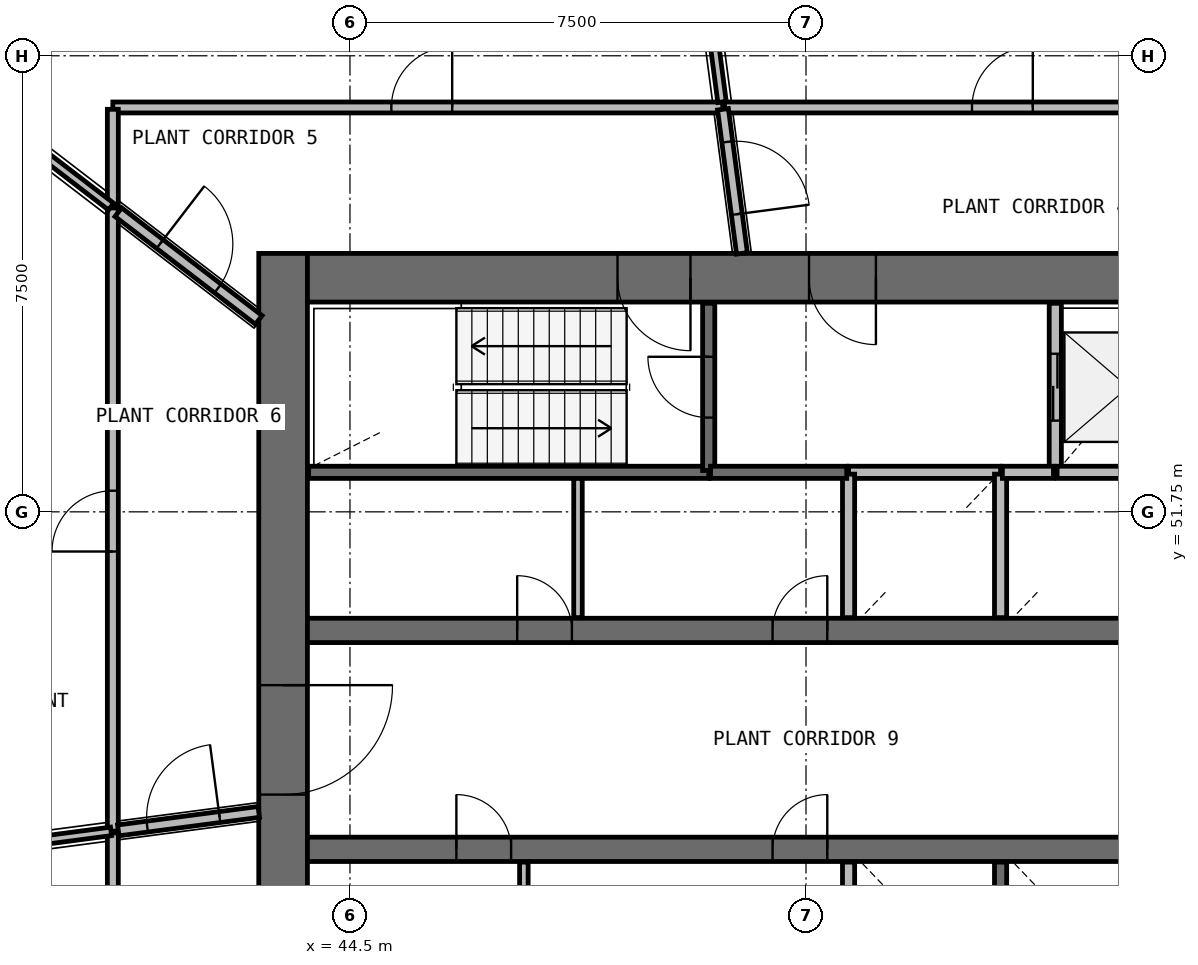
"""IFC4 building model, lengths in metres.
Left out: names, types, materials, properties, quantities, classifications, styles, units other than length and angle.
Written with IfcOpenShell. Run it as: python <this file> out.ifc"""

import sys

from ifc_helpers import new_model, si_unit, direction, frame, frame_2d, origin, place, context, subcontext, project, spatial, rectangle, extrude, source, transform, mapped, element, fill, save


model = new_model("IFC4")
c1 = context("Model", 3, precision=1e-05, world=origin(), true_north=direction((0.0, 1.0)))
c2 = subcontext(c1, "Body", "Model", "MODEL_VIEW")
j1 = project(units=[si_unit("LENGTHUNIT", "METRE"), si_unit("PLANEANGLEUNIT", "RADIAN")], contexts=[c1])
p1 = place(None, origin())
s1 = spatial("IfcSite", under=j1, at=p1, CompositionType="ELEMENT")
p2 = place(p1, origin())
s2 = spatial("IfcBuilding", under=s1, at=p2, CompositionType="ELEMENT")
p3 = place(p2, frame((0.0, 0.0, 179.9)))
s3 = spatial("IfcBuildingStorey", under=s2, at=p3, CompositionType="ELEMENT", Elevation=179.9)
p4 = place(p3, frame((43.4, 56.0, 0.0), z_axis=(0.0, 0.0, 1.0), x_axis=(0.0, -1.0, 0.0)))
e1 = element("IfcWall", 1, at=p4, inside=s3, PredefinedType="SHEAR", context=c2, shape_type="SweptSolid", body=[
    extrude(rectangle(XDim=16.0, YDim=0.8, at=frame_2d((8.0, 0.0))), origin(), (0.0, 0.0, 1.0), 3.9),
])
p5 = place(p4, frame((7.1, 0.0, 0.0)))
e2 = element("IfcOpeningElement", 2, at=p5, cuts=e1, PredefinedType="OPENING", context=c2, shape_type="SweptSolid", body=[
    extrude(rectangle(XDim=1.8, YDim=2.1, at=frame_2d((0.9, 1.05))), frame((0.0, 0.41, 0.0), z_axis=(0.0, -1.0, 0.0), x_axis=(1.0, 0.0, 0.0)), (0.0, 0.0, 1.0), 0.82),
])
p6 = place(p3, frame((60.2, 55.6, 0.0), z_axis=(0.0, 0.0, 1.0), x_axis=(-1.0, 0.0, 0.0)))
e3 = element("IfcWall", 3, at=p6, inside=s3, PredefinedType="SHEAR", context=c2, shape_type="SweptSolid", body=[
    extrude(rectangle(XDim=16.4, YDim=0.8, at=frame_2d((8.2, 0.0))), origin(), (0.0, 0.0, 1.0), 3.9),
])
p7 = place(p6, frame((0.2, 0.0, 0.0)))
e4 = element("IfcOpeningElement", 4, at=p7, cuts=e3, PredefinedType="OPENING", context=c2, shape_type="SweptSolid", body=[
    extrude(rectangle(XDim=1.1, YDim=2.1, at=frame_2d((0.55, 1.05))), frame((0.0, 0.41, 0.0), z_axis=(0.0, -1.0, 0.0), x_axis=(1.0, 0.0, 0.0)), (0.0, 0.0, 1.0), 0.82),
])
p8 = place(p6, frame((10.1, 0.0, 0.0)))
e5 = element("IfcOpeningElement", 5, at=p8, cuts=e3, PredefinedType="OPENING", context=c2, shape_type="SweptSolid", body=[
    extrude(rectangle(XDim=1.2, YDim=2.1, at=frame_2d((0.6, 1.05))), frame((0.0, 0.41, 0.0), z_axis=(0.0, -1.0, 0.0), x_axis=(1.0, 0.0, 0.0)), (0.0, 0.0, 1.0), 0.82),
])
p9 = place(p6, frame((7.05, 0.0, 0.0)))
e6 = element("IfcOpeningElement", 6, at=p9, cuts=e3, PredefinedType="OPENING", context=c2, shape_type="SweptSolid", body=[
    extrude(rectangle(XDim=1.1, YDim=2.1, at=frame_2d((0.55, 1.05))), frame((0.0, 0.41, 0.0), z_axis=(0.0, -1.0, 0.0), x_axis=(1.0, 0.0, 0.0)), (0.0, 0.0, 1.0), 0.82),
])
p10 = place(p3, frame((43.8, 49.8, 0.0), z_axis=(0.0, 0.0, 1.0), x_axis=(1.0, 0.0, 0.0)))
e7 = element("IfcWall", 7, at=p10, inside=s3, PredefinedType="SHEAR", context=c2, shape_type="SweptSolid", body=[
    extrude(rectangle(XDim=16.4, YDim=0.4, at=frame_2d((8.2, 0.0))), origin(), (0.0, 0.0, 1.0), 3.9),
])
p11 = place(p10, frame((3.45, 0.0, 0.0)))
e8 = element("IfcOpeningElement", 8, at=p11, cuts=e7, PredefinedType="OPENING", context=c2, shape_type="SweptSolid", body=[
    extrude(rectangle(XDim=0.9, YDim=2.1, at=frame_2d((0.45, 1.05))), frame((0.0, 0.21, 0.0), z_axis=(0.0, -1.0, 0.0), x_axis=(1.0, 0.0, 0.0)), (0.0, 0.0, 1.0), 0.42),
])
p12 = place(p10, frame((7.65, 0.0, 0.0)))
e9 = element("IfcOpeningElement", 9, at=p12, cuts=e7, PredefinedType="OPENING", context=c2, shape_type="SweptSolid", body=[
    extrude(rectangle(XDim=0.9, YDim=2.1, at=frame_2d((0.45, 1.05))), frame((0.0, 0.21, 0.0), z_axis=(0.0, -1.0, 0.0), x_axis=(1.0, 0.0, 0.0)), (0.0, 0.0, 1.0), 0.42),
])
p13 = place(p3, frame((43.8, 46.2, 0.0), z_axis=(0.0, 0.0, 1.0), x_axis=(1.0, 0.0, 0.0)))
e10 = element("IfcWall", 10, at=p13, inside=s3, PredefinedType="SHEAR", context=c2, shape_type="SweptSolid", body=[
    extrude(rectangle(XDim=16.4, YDim=0.4, at=frame_2d((8.2, 0.0))), origin(), (0.0, 0.0, 1.0), 3.9),
])
p14 = place(p13, frame((2.45, 0.0, 0.0)))
e11 = element("IfcOpeningElement", 11, at=p14, cuts=e10, PredefinedType="OPENING", context=c2, shape_type="SweptSolid", body=[
    extrude(rectangle(XDim=0.9, YDim=2.1, at=frame_2d((0.45, 1.05))), frame((0.0, 0.21, 0.0), z_axis=(0.0, -1.0, 0.0), x_axis=(1.0, 0.0, 0.0)), (0.0, 0.0, 1.0), 0.42),
])
p15 = place(p13, frame((7.65, 0.0, 0.0)))
e12 = element("IfcOpeningElement", 12, at=p15, cuts=e10, PredefinedType="OPENING", context=c2, shape_type="SweptSolid", body=[
    extrude(rectangle(XDim=0.9, YDim=2.1, at=frame_2d((0.45, 1.05))), frame((0.0, 0.21, 0.0), z_axis=(0.0, -1.0, 0.0), x_axis=(1.0, 0.0, 0.0)), (0.0, 0.0, 1.0), 0.42),
])
p16 = place(p3, frame((43.82, 52.4, 0.0), z_axis=(0.0, 0.0, 1.0), x_axis=(1.0, 0.0, 0.0)))
e13 = element("IfcWall", 13, at=p16, inside=s3, PredefinedType="SOLIDWALL", context=c2, shape_type="SweptSolid", body=[
    extrude(rectangle(XDim=6.58, YDim=0.2, at=frame_2d((3.29, 0.0))), origin(), (0.0, 0.0, 1.0), 3.58),
])
p17 = place(p3, frame((50.4, 52.43, 0.0), z_axis=(0.0, 0.0, 1.0), x_axis=(0.0, 1.0, 0.0)))
e14 = element("IfcWall", 14, at=p17, inside=s3, PredefinedType="SOLIDWALL", context=c2, shape_type="SweptSolid", body=[
    extrude(rectangle(XDim=2.75, YDim=0.2, at=frame_2d((1.375, 0.0))), origin(), (0.0, 0.0, 1.0), 3.58),
])
p18 = place(p17, frame((0.87, 0.0, 0.0)))
e15 = element("IfcOpeningElement", 15, at=p18, cuts=e14, PredefinedType="OPENING", context=c2, shape_type="SweptSolid", body=[
    extrude(rectangle(XDim=1.0, YDim=2.1, at=frame_2d((0.5, 1.05))), frame((0.0, 0.11, 0.0), z_axis=(0.0, -1.0, 0.0), x_axis=(1.0, 0.0, 0.0)), (0.0, 0.0, 1.0), 0.22),
])
p19 = place(p3, frame((56.1, 55.18, 0.0), z_axis=(0.0, 0.0, 1.0), x_axis=(0.0, -1.0, 0.0)))
e16 = element("IfcWall", 16, at=p19, inside=s3, PredefinedType="SOLIDWALL", context=c2, shape_type="SweptSolid", body=[
    extrude(rectangle(XDim=2.78, YDim=0.2, at=frame_2d((1.39, 0.0))), origin(), (0.0, 0.0, 1.0), 3.58),
])
p20 = place(p19, frame((0.83, 0.0, 0.0)))
e17 = element("IfcOpeningElement", 17, at=p20, cuts=e16, PredefinedType="OPENING", context=c2, shape_type="SweptSolid", body=[
    extrude(rectangle(XDim=1.1, YDim=2.1, at=frame_2d((0.55, 1.05))), frame((0.0, 0.11, 0.0), z_axis=(0.0, -1.0, 0.0), x_axis=(1.0, 0.0, 0.0)), (0.0, 0.0, 1.0), 0.22),
])
p21 = place(p3, frame((55.2, 52.4, 0.0), z_axis=(0.0, 0.0, 1.0), x_axis=(-1.0, 0.0, 0.0)))
e18 = element("IfcWall", 18, at=p21, inside=s3, PredefinedType="SOLIDWALL", context=c2, shape_type="SweptSolid", body=[
    extrude(rectangle(XDim=2.5, YDim=0.2, at=frame_2d((1.25, 0.0))), origin(), (0.0, 0.0, 1.0), 3.58),
])
for number, where, z_axis, x_axis in (
    (19, (52.7, 45.99, 0.0), (0.0, 0.0, 1.0), (0.0, -1.0, 0.0)),
    (20, (52.7, 52.37, 0.0), (0.0, 0.0, 1.0), (0.0, -1.0, 0.0)),
    (21, (55.2, 43.63, 0.0), (0.0, 0.0, 1.0), (0.0, 1.0, 0.0)),
    (22, (55.2, 50.01, 0.0), (0.0, 0.0, 1.0), (0.0, 1.0, 0.0)),
):
    element("IfcWall", number, at=place(p3, frame(where, z_axis=z_axis, x_axis=x_axis)), inside=s3, PredefinedType="SOLIDWALL", context=c2, shape_type="SweptSolid", body=[
        extrude(rectangle(XDim=2.36, YDim=0.2, at=frame_2d((1.18, 0.0))), origin(), (0.0, 0.0, 1.0), 3.58),
    ])
p22 = place(p3, frame((50.43, 52.4, 0.0), z_axis=(0.0, 0.0, 1.0), x_axis=(1.0, 0.0, 0.0)))
e23 = element("IfcWall", 23, at=p22, inside=s3, PredefinedType="SOLIDWALL", context=c2, shape_type="SweptSolid", body=[
    extrude(rectangle(XDim=2.24, YDim=0.2, at=frame_2d((1.12, 0.0))), origin(), (0.0, 0.0, 1.0), 3.58),
])
p23 = place(p3, frame((57.67, 52.4, 0.0), z_axis=(0.0, 0.0, 1.0), x_axis=(-1.0, 0.0, 0.0)))
e24 = element("IfcWall", 24, at=p23, inside=s3, PredefinedType="SOLIDWALL", context=c2, shape_type="SweptSolid", body=[
    extrude(rectangle(XDim=1.54, YDim=0.2, at=frame_2d((0.77, 0.0))), origin(), (0.0, 0.0, 1.0), 3.58),
])
p24 = place(p3, frame((56.07, 52.4, 0.0), z_axis=(0.0, 0.0, 1.0), x_axis=(-1.0, 0.0, 0.0)))
e25 = element("IfcWall", 25, at=p24, inside=s3, PredefinedType="SOLIDWALL", context=c2, shape_type="SweptSolid", body=[
    extrude(rectangle(XDim=0.84, YDim=0.2, at=frame_2d((0.42, 0.0))), origin(), (0.0, 0.0, 1.0), 3.58),
])
p25 = place(p3, frame((40.6, 46.499, 0.0), z_axis=(0.0, 0.0, 1.0), x_axis=(0.0, 1.0, 0.0)))
e26 = element("IfcWall", 26, at=p25, inside=s3, PredefinedType="PARTITIONING", context=c2, shape_type="SweptSolid", body=[
    extrude(rectangle(XDim=10.248, YDim=0.18, at=frame_2d((5.124, 0.0))), origin(), (0.0, 0.0, 1.0), 2.38),
])
p26 = place(p25, frame((4.598, 0.0, 0.0)))
e27 = element("IfcOpeningElement", 27, at=p26, cuts=e26, PredefinedType="OPENING", context=c2, shape_type="SweptSolid", body=[
    extrude(rectangle(XDim=1.0, YDim=2.1, at=frame_2d((0.5, 1.05))), frame((0.0, 0.1, 0.0), z_axis=(0.0, -1.0, 0.0), x_axis=(1.0, 0.0, 0.0)), (0.0, 0.0, 1.0), 0.2),
])
p27 = place(p3, frame((40.6, 58.4, 0.0), z_axis=(0.0, 0.0, 1.0), x_axis=(1.0, 0.0, 0.0)))
e28 = element("IfcWall", 28, at=p27, inside=s3, PredefinedType="PARTITIONING", context=c2, shape_type="SweptSolid", body=[
    extrude(rectangle(XDim=10.031, YDim=0.18, at=frame_2d((5.015, 0.0))), origin(), (0.0, 0.0, 1.0), 2.38),
])
p28 = place(p27, frame((4.581, 0.0, 0.0)))
e29 = element("IfcOpeningElement", 29, at=p28, cuts=e28, PredefinedType="OPENING", context=c2, shape_type="SweptSolid", body=[
    extrude(rectangle(XDim=1.0, YDim=2.1, at=frame_2d((0.5, 1.05))), frame((0.0, 0.1, 0.0), z_axis=(0.0, -1.0, 0.0), x_axis=(1.0, 0.0, 0.0)), (0.0, 0.0, 1.0), 0.2),
])
p29 = place(p3, frame((50.661, 58.4, 0.0), z_axis=(0.0, 0.0, 1.0), x_axis=(1.0, 0.0, 0.0)))
e30 = element("IfcWall", 30, at=p29, inside=s3, PredefinedType="PARTITIONING", context=c2, shape_type="SweptSolid", body=[
    extrude(rectangle(XDim=9.319, YDim=0.18, at=frame_2d((4.66, 0.0))), origin(), (0.0, 0.0, 1.0), 2.38),
])
p30 = place(p29, frame((4.069, 0.0, 0.0)))
e31 = element("IfcOpeningElement", 31, at=p30, cuts=e30, PredefinedType="OPENING", context=c2, shape_type="SweptSolid", body=[
    extrude(rectangle(XDim=1.0, YDim=2.1, at=frame_2d((0.5, 1.05))), frame((0.0, 0.1, 0.0), z_axis=(0.0, -1.0, 0.0), x_axis=(1.0, 0.0, 0.0)), (0.0, 0.0, 1.0), 0.2),
])
p31 = place(p3, frame((40.6, 46.469, 0.0), z_axis=(0.0, 0.0, 1.0), x_axis=(0.0, -1.0, 0.0)))
e32 = element("IfcWall", 32, at=p31, inside=s3, PredefinedType="PARTITIONING", context=c2, shape_type="SweptSolid", body=[
    extrude(rectangle(XDim=8.869, YDim=0.18, at=frame_2d((4.435, 0.0))), origin(), (0.0, 0.0, 1.0), 2.38),
])
p32 = place(p3, frame((40.69, 56.678, 0.0), z_axis=(0.0, 0.0, 1.0), x_axis=(0.793371480341, -0.608737787706, 0.0)))
e33 = element("IfcWall", 33, at=p32, inside=s3, PredefinedType="PARTITIONING", context=c2, shape_type="SweptSolid", body=[
    extrude(rectangle(XDim=2.912, YDim=0.18, at=frame_2d((1.456, 0.0))), origin(), (0.0, 0.0, 1.0), 2.38),
])
p33 = place(p32, frame((0.862, 0.0, 0.0)))
e34 = element("IfcOpeningElement", 34, at=p33, cuts=e33, PredefinedType="OPENING", context=c2, shape_type="SweptSolid", body=[
    extrude(rectangle(XDim=1.2, YDim=2.1, at=frame_2d((0.6, 1.05))), frame((0.0, 0.1, 0.0), z_axis=(0.0, -1.0, 0.0), x_axis=(1.0, 0.0, 0.0)), (0.0, 0.0, 1.0), 0.2),
])
p34 = place(p3, frame((40.69, 46.511, 0.0), z_axis=(0.0, 0.0, 1.0), x_axis=(0.991440737811, 0.130557509967, 0.0)))
e35 = element("IfcWall", 35, at=p34, inside=s3, PredefinedType="PARTITIONING", context=c2, shape_type="SweptSolid", body=[
    extrude(rectangle(XDim=2.33, YDim=0.18, at=frame_2d((1.165, 0.0))), origin(), (0.0, 0.0, 1.0), 2.38),
])
p35 = place(p34, frame((0.48, 0.0, 0.0)))
e36 = element("IfcOpeningElement", 36, at=p35, cuts=e35, PredefinedType="OPENING", context=c2, shape_type="SweptSolid", body=[
    extrude(rectangle(XDim=1.2, YDim=2.1, at=frame_2d((0.6, 1.05))), frame((0.0, 0.1, 0.0), z_axis=(0.0, -1.0, 0.0), x_axis=(1.0, 0.0, 0.0)), (0.0, 0.0, 1.0), 0.2),
])
p36 = place(p3, frame((50.635, 58.37, 0.0), z_axis=(0.0, 0.0, 1.0), x_axis=(0.130504701654, -0.991447690424, 0.0)))
e37 = element("IfcWall", 37, at=p36, inside=s3, PredefinedType="PARTITIONING", context=c2, shape_type="SweptSolid", body=[
    extrude(rectangle(XDim=2.391, YDim=0.18, at=frame_2d((1.195, 0.0))), origin(), (0.0, 0.0, 1.0), 2.38),
])
p37 = place(p36, frame((0.541, 0.0, 0.0)))
e38 = element("IfcOpeningElement", 38, at=p37, cuts=e37, PredefinedType="OPENING", context=c2, shape_type="SweptSolid", body=[
    extrude(rectangle(XDim=1.2, YDim=2.1, at=frame_2d((0.6, 1.05))), frame((0.0, 0.1, 0.0), z_axis=(0.0, -1.0, 0.0), x_axis=(1.0, 0.0, 0.0)), (0.0, 0.0, 1.0), 0.2),
])
p38 = place(p3, frame((40.6, 58.37, 0.0), z_axis=(0.0, 0.0, 1.0), x_axis=(0.0, -1.0, 0.0)))
e39 = element("IfcWall", 39, at=p38, inside=s3, PredefinedType="PARTITIONING", context=c2, shape_type="SweptSolid", body=[
    extrude(rectangle(XDim=1.593, YDim=0.18, at=frame_2d((0.796, 0.0))), origin(), (0.0, 0.0, 1.0), 2.38),
])
p39 = place(p3, frame((40.57, 46.495, 0.0), z_axis=(0.0, 0.0, 1.0), x_axis=(-0.991448780362, -0.130496421093, 0.0)))
e40 = element("IfcWall", 40, at=p39, inside=s3, PredefinedType="PARTITIONING", context=c2, shape_type="SweptSolid", body=[
    extrude(rectangle(XDim=4.672, YDim=0.14, at=frame_2d((2.336, 0.0))), origin(), (0.0, 0.0, 1.0), 2.38),
])
p40 = place(p3, frame((50.619, 58.49, 0.0), z_axis=(0.0, 0.0, 1.0), x_axis=(-0.130517317695, 0.991446029687, 0.0)))
e41 = element("IfcWall", 41, at=p40, inside=s3, PredefinedType="PARTITIONING", context=c2, shape_type="SweptSolid", body=[
    extrude(rectangle(XDim=3.72, YDim=0.14, at=frame_2d((1.86, 0.0))), origin(), (0.0, 0.0, 1.0), 2.38),
])
for number, where, z_axis, x_axis in (
    (42, (47.36, 43.7, 0.0), (0.0, 0.0, 1.0), (0.0, 1.0, 0.0)),
    (43, (48.25, 50.01, 0.0), (0.0, 0.0, 1.0), (0.0, 1.0, 0.0)),
):
    element("IfcWall", number, at=place(p3, frame(where, z_axis=z_axis, x_axis=x_axis)), inside=s3, PredefinedType="PARTITIONING", context=c2, shape_type="SweptSolid", body=[
        extrude(rectangle(XDim=2.29, YDim=0.14, at=frame_2d((1.145, 0.0))), origin(), (0.0, 0.0, 1.0), 2.88),
    ])
p41 = place(p3, frame((40.571, 56.77, 0.0), z_axis=(0.0, 0.0, 1.0), x_axis=(-0.79337054143, 0.608739011393, 0.0)))
e44 = element("IfcWall", 44, at=p41, inside=s3, PredefinedType="PARTITIONING", context=c2, shape_type="SweptSolid", body=[
    extrude(rectangle(XDim=2.15, YDim=0.14, at=frame_2d((1.075, 0.0))), origin(), (0.0, 0.0, 1.0), 2.38),
])
m1 = source(origin(), c2, "Body", "SweptSolid", [
    extrude(rectangle(XDim=1.8, YDim=2.1, at=frame_2d((0.9, 1.05))), frame((0.0, 0.025, 0.0), z_axis=(0.0, -1.0, 0.0), x_axis=(1.0, 0.0, 0.0)), (0.0, 0.0, 1.0), 0.05),
])
p42 = place(p5, origin())
e45 = element("IfcDoor", 45, at=p42, inside=s3, OperationType="SINGLE_SWING_LEFT", PredefinedType="DOOR", context=c2, shape_type="MappedRepresentation", body=[
    mapped(m1, transform((0.0, 0.0, 0.0), scale=1.0)),
])
fill(e2, e45)
m2 = source(origin(), c2, "Body", "SweptSolid", [
    extrude(rectangle(XDim=1.1, YDim=2.1, at=frame_2d((0.55, 1.05))), frame((0.0, 0.025, 0.0), z_axis=(0.0, -1.0, 0.0), x_axis=(1.0, 0.0, 0.0)), (0.0, 0.0, 1.0), 0.05),
])
p43 = place(p20, origin())
e46 = element("IfcDoor", 46, at=p43, inside=s3, OperationType="DOUBLE_DOOR_SLIDING", PredefinedType="USERDEFINED", context=c2, shape_type="MappedRepresentation", body=[
    mapped(m2, transform((0.0, 0.0, 0.0), scale=1.0)),
])
fill(e17, e46)
m3 = source(origin(), c2, "Body", "SweptSolid", [
    extrude(rectangle(XDim=1.2, YDim=2.1, at=frame_2d((0.6, 1.05))), frame((0.0, 0.025, 0.0), z_axis=(0.0, -1.0, 0.0), x_axis=(1.0, 0.0, 0.0)), (0.0, 0.0, 1.0), 0.05),
])
p44 = place(p8, origin())
e47 = element("IfcDoor", 47, at=p44, inside=s3, OperationType="SINGLE_SWING_LEFT", PredefinedType="DOOR", context=c2, shape_type="MappedRepresentation", body=[
    mapped(m3, transform((0.0, 0.0, 0.0), scale=1.0)),
])
fill(e5, e47)
m4 = source(origin(), c2, "Body", "SweptSolid", [
    extrude(rectangle(XDim=1.0, YDim=2.1, at=frame_2d((0.5, 1.05))), frame((0.0, 0.025, 0.0), z_axis=(0.0, -1.0, 0.0), x_axis=(1.0, 0.0, 0.0)), (0.0, 0.0, 1.0), 0.05),
])
p45 = place(p18, origin())
e48 = element("IfcDoor", 48, at=p45, inside=s3, OperationType="SINGLE_SWING_RIGHT", PredefinedType="DOOR", context=c2, shape_type="MappedRepresentation", body=[
    mapped(m4, transform((0.0, 0.0, 0.0), scale=1.0)),
])
fill(e15, e48)
m5 = source(origin(), c2, "Body", "SweptSolid", [
    extrude(rectangle(XDim=1.1, YDim=2.1, at=frame_2d((0.55, 1.05))), frame((0.0, 0.025, 0.0), z_axis=(0.0, -1.0, 0.0), x_axis=(1.0, 0.0, 0.0)), (0.0, 0.0, 1.0), 0.05),
])
p46 = place(p9, origin())
e49 = element("IfcDoor", 49, at=p46, inside=s3, OperationType="SINGLE_SWING_LEFT", PredefinedType="DOOR", context=c2, shape_type="MappedRepresentation", body=[
    mapped(m5, transform((0.0, 0.0, 0.0), scale=1.0)),
])
fill(e6, e49)
m6 = source(origin(), c2, "Body", "SweptSolid", [
    extrude(rectangle(XDim=1.0, YDim=2.1, at=frame_2d((0.5, 1.05))), frame((0.0, 0.025, 0.0), z_axis=(0.0, -1.0, 0.0), x_axis=(1.0, 0.0, 0.0)), (0.0, 0.0, 1.0), 0.05),
])
p47 = place(p30, origin())
e50 = element("IfcDoor", 50, at=p47, inside=s3, OperationType="SINGLE_SWING_RIGHT", PredefinedType="DOOR", context=c2, shape_type="MappedRepresentation", body=[
    mapped(m6, transform((0.0, 0.0, 0.0), scale=1.0)),
])
fill(e31, e50)
p48 = place(p28, origin())
e51 = element("IfcDoor", 51, at=p48, inside=s3, OperationType="SINGLE_SWING_RIGHT", PredefinedType="DOOR", context=c2, shape_type="MappedRepresentation", body=[
    mapped(m6, transform((0.0, 0.0, 0.0), scale=1.0)),
])
fill(e29, e51)
p49 = place(p26, origin())
e52 = element("IfcDoor", 52, at=p49, inside=s3, OperationType="SINGLE_SWING_LEFT", PredefinedType="DOOR", context=c2, shape_type="MappedRepresentation", body=[
    mapped(m6, transform((0.0, 0.0, 0.0), scale=1.0)),
])
fill(e27, e52)
m7 = source(origin(), c2, "Body", "SweptSolid", [
    extrude(rectangle(XDim=1.2, YDim=2.1, at=frame_2d((0.6, 1.05))), frame((0.0, 0.025, 0.0), z_axis=(0.0, -1.0, 0.0), x_axis=(1.0, 0.0, 0.0)), (0.0, 0.0, 1.0), 0.05),
])
p50 = place(p37, origin())
e53 = element("IfcDoor", 53, at=p50, inside=s3, OperationType="SINGLE_SWING_RIGHT", PredefinedType="DOOR", context=c2, shape_type="MappedRepresentation", body=[
    mapped(m7, transform((0.0, 0.0, 0.0), scale=1.0)),
])
fill(e38, e53)
p51 = place(p33, origin())
e54 = element("IfcDoor", 54, at=p51, inside=s3, OperationType="SINGLE_SWING_LEFT", PredefinedType="DOOR", context=c2, shape_type="MappedRepresentation", body=[
    mapped(m7, transform((0.0, 0.0, 0.0), scale=1.0)),
])
fill(e34, e54)
p52 = place(p35, origin())
e55 = element("IfcDoor", 55, at=p52, inside=s3, OperationType="SINGLE_SWING_RIGHT", PredefinedType="DOOR", context=c2, shape_type="MappedRepresentation", body=[
    mapped(m7, transform((0.0, 0.0, 0.0), scale=1.0)),
])
fill(e36, e55)
m8 = source(origin(), c2, "Body", "SweptSolid", [
    extrude(rectangle(XDim=0.9, YDim=2.1, at=frame_2d((0.45, 1.05))), frame((0.0, 0.025, 0.0), z_axis=(0.0, -1.0, 0.0), x_axis=(1.0, 0.0, 0.0)), (0.0, 0.0, 1.0), 0.05),
])
p53 = place(p11, origin())
e56 = element("IfcDoor", 56, at=p53, inside=s3, OperationType="SINGLE_SWING_LEFT", PredefinedType="DOOR", context=c2, shape_type="MappedRepresentation", body=[
    mapped(m8, transform((0.0, 0.0, 0.0), scale=1.0)),
])
fill(e8, e56)
p54 = place(p12, origin())
e57 = element("IfcDoor", 57, at=p54, inside=s3, OperationType="SINGLE_SWING_RIGHT", PredefinedType="DOOR", context=c2, shape_type="MappedRepresentation", body=[
    mapped(m8, transform((0.0, 0.0, 0.0), scale=1.0)),
])
fill(e9, e57)
p55 = place(p14, origin())
e58 = element("IfcDoor", 58, at=p55, inside=s3, OperationType="SINGLE_SWING_LEFT", PredefinedType="DOOR", context=c2, shape_type="MappedRepresentation", body=[
    mapped(m8, transform((0.0, 0.0, 0.0), scale=1.0)),
])
fill(e11, e58)
p56 = place(p15, origin())
e59 = element("IfcDoor", 59, at=p56, inside=s3, OperationType="SINGLE_SWING_RIGHT", PredefinedType="DOOR", context=c2, shape_type="MappedRepresentation", body=[
    mapped(m8, transform((0.0, 0.0, 0.0), scale=1.0)),
])
fill(e12, e59)
save(model, sys.argv[1])
